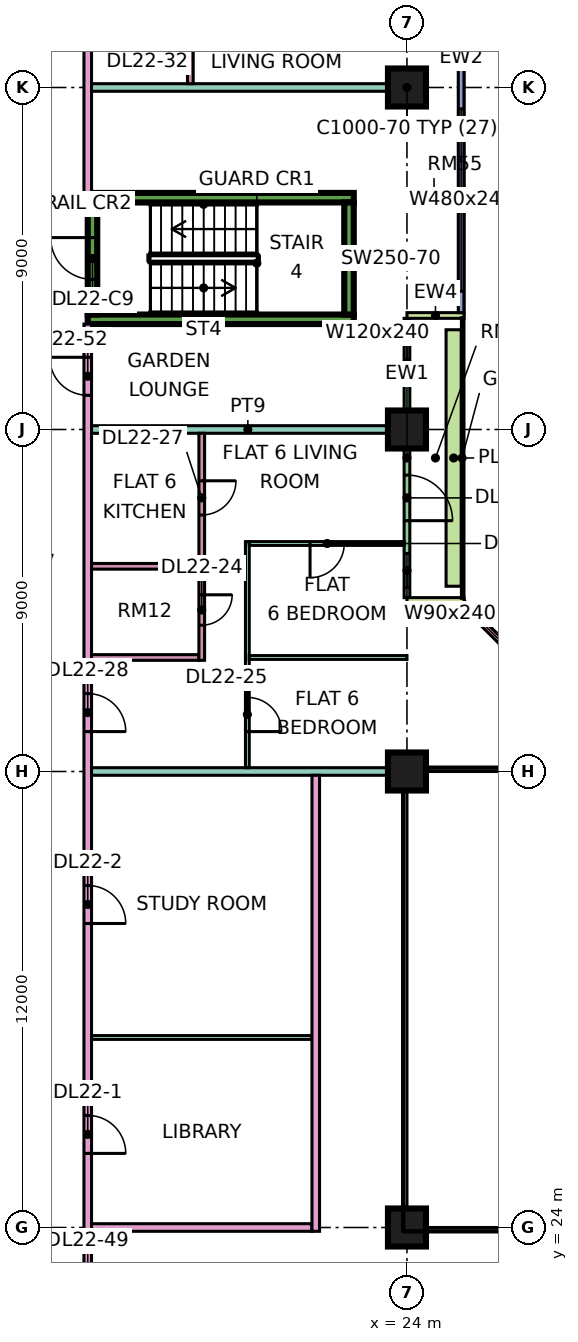
"""IFC4 building model, lengths in metres.
Left out: names, types, materials, properties, quantities, classifications, styles, units other than length and angle.
Written with IfcOpenShell. Run it as: python <this file> out.ifc"""

import sys

from ifc_helpers import new_model, si_unit, direction, frame, frame_2d, origin, origin_2d, place, context, subcontext, project, spatial, rectangle, extrude, element, fill, save


model = new_model("IFC4")
c1 = context("Model", 3, precision=1e-05, world=origin(), true_north=direction((0.0, 1.0)))
c2 = subcontext(c1, "Body", "Model", "MODEL_VIEW")
j1 = project(units=[si_unit("LENGTHUNIT", "METRE"), si_unit("PLANEANGLEUNIT", "RADIAN")], contexts=[c1])
p1 = place(None, origin())
s1 = spatial("IfcSite", under=j1, at=p1, CompositionType="ELEMENT")
p2 = place(p1, origin())
s2 = spatial("IfcBuilding", under=s1, at=p2, CompositionType="ELEMENT")
p3 = place(p2, frame((0.0, 0.0, 99.4)))
s3 = spatial("IfcBuildingStorey", under=s2, at=p3, CompositionType="ELEMENT", Elevation=99.4)
for number, where, z_axis, x_axis in (
    (1, (24.0, 24.0, 0.0), (0.0, 0.0, 1.0), (1.0, 0.0, 0.0)),
    (2, (24.0, 36.0, 0.0), (0.0, 0.0, 1.0), (1.0, 0.0, 0.0)),
    (3, (24.0, 45.0, 0.0), (0.0, 0.0, 1.0), (1.0, 0.0, 0.0)),
    (4, (24.0, 54.0, 0.0), (0.0, 0.0, 1.0), (1.0, 0.0, 0.0)),
):
    element("IfcColumn", number, at=place(p3, frame(where, z_axis=z_axis, x_axis=x_axis)), inside=s3, PredefinedType="COLUMN", context=c2, shape_type="SweptSolid", body=[
        extrude(rectangle(XDim=1.0, YDim=1.0, at=origin_2d()), origin(), (0.0, 0.0, 1.0), 3.75),
    ])
for number, where, z_axis, x_axis in (
    (5, (15.6, 47.9, 0.0), (0.0, 0.0, 1.0), (1.0, 0.0, 0.0)),
    (6, (15.6, 51.1, 0.0), (0.0, 0.0, 1.0), (1.0, 0.0, 0.0)),
):
    element("IfcWall", number, at=place(p3, frame(where, z_axis=z_axis, x_axis=x_axis)), inside=s3, PredefinedType="SHEAR", context=c2, shape_type="SweptSolid", body=[
        extrude(rectangle(XDim=7.0, YDim=0.25, at=frame_2d((3.5, 0.0))), origin(), (0.0, 0.0, 1.0), 3.75),
    ])
p4 = place(p3, frame((15.725, 48.025, 0.0), z_axis=(0.0, 0.0, 1.0), x_axis=(0.0, 1.0, 0.0)))
e7 = element("IfcWall", 7, at=p4, inside=s3, PredefinedType="SHEAR", context=c2, shape_type="SweptSolid", body=[
    extrude(rectangle(XDim=2.95, YDim=0.25, at=frame_2d((1.475, 0.0))), origin(), (0.0, 0.0, 1.0), 3.75),
])
p5 = place(p4, frame((0.925, 0.0, 0.0)))
e8 = element("IfcOpeningElement", 8, at=p5, cuts=e7, PredefinedType="OPENING", context=c2, shape_type="SweptSolid", body=[
    extrude(rectangle(XDim=1.1, YDim=2.2, at=frame_2d((0.55, 1.1))), frame((0.0, 0.135, 0.0), z_axis=(0.0, -1.0, 0.0), x_axis=(1.0, 0.0, 0.0)), (0.0, 0.0, 1.0), 0.27),
])
p6 = place(p3, frame((22.475, 48.025, 0.0), z_axis=(0.0, 0.0, 1.0), x_axis=(0.0, 1.0, 0.0)))
e9 = element("IfcWall", 9, at=p6, inside=s3, PredefinedType="SHEAR", context=c2, shape_type="SweptSolid", body=[
    extrude(rectangle(XDim=2.95, YDim=0.25, at=frame_2d((1.475, 0.0))), origin(), (0.0, 0.0, 1.0), 3.75),
])
p7 = place(p3, frame((28.447, 37.447, 0.0), z_axis=(0.0, 0.0, 1.0), x_axis=(-0.707106781187, 0.707106781187, 0.0)))
e10 = element("IfcWall", 10, at=p7, inside=s3, PredefinedType="SOLIDWALL", context=c2, shape_type="SweptSolid", body=[
    extrude(rectangle(XDim=4.243, YDim=0.15, at=frame_2d((2.121, 0.0))), origin(), (0.0, 0.0, 1.0), 3.35),
])
p8 = place(p7, frame((0.621, 0.0, 0.45)))
e11 = element("IfcOpeningElement", 11, at=p8, cuts=e10, PredefinedType="OPENING", context=c2, shape_type="SweptSolid", body=[
    extrude(rectangle(XDim=3.0, YDim=2.4, at=frame_2d((1.5, 1.2))), frame((0.0, 0.085, 0.0), z_axis=(0.0, -1.0, 0.0), x_axis=(1.0, 0.0, 0.0)), (0.0, 0.0, 1.0), 0.17),
])
p9 = place(p3, frame((24.0, 40.575, 0.0), z_axis=(0.0, 0.0, 1.0), x_axis=(0.0, 1.0, 0.0)))
e12 = element("IfcWall", 12, at=p9, inside=s3, PredefinedType="SOLIDWALL", context=c2, shape_type="SweptSolid", body=[
    extrude(rectangle(XDim=7.35, YDim=0.15, at=frame_2d((3.675, 0.0))), origin(), (0.0, 0.0, 1.0), 3.35),
])
p10 = place(p9, frame((0.262, 0.0, 0.45)))
e13 = element("IfcOpeningElement", 13, at=p10, cuts=e12, PredefinedType="OPENING", context=c2, shape_type="SweptSolid", body=[
    extrude(rectangle(XDim=0.9, YDim=2.4, at=frame_2d((0.45, 1.2))), frame((0.0, 0.085, 0.0), z_axis=(0.0, -1.0, 0.0), x_axis=(1.0, 0.0, 0.0)), (0.0, 0.0, 1.0), 0.17),
])
p11 = place(p9, frame((2.025, 0.0, 0.0)))
e14 = element("IfcOpeningElement", 14, at=p11, cuts=e12, PredefinedType="OPENING", context=c2, shape_type="SweptSolid", body=[
    extrude(rectangle(XDim=1.2, YDim=2.4, at=frame_2d((0.6, 1.2))), frame((0.0, 0.085, 0.0), z_axis=(0.0, -1.0, 0.0), x_axis=(1.0, 0.0, 0.0)), (0.0, 0.0, 1.0), 0.17),
])
p12 = place(p9, frame((5.587, 0.0, 0.45)))
e15 = element("IfcOpeningElement", 15, at=p12, cuts=e12, PredefinedType="OPENING", context=c2, shape_type="SweptSolid", body=[
    extrude(rectangle(XDim=1.2, YDim=2.4, at=frame_2d((0.6, 1.2))), frame((0.0, 0.085, 0.0), z_axis=(0.0, -1.0, 0.0), x_axis=(1.0, 0.0, 0.0)), (0.0, 0.0, 1.0), 0.17),
])
for number, where, z_axis, x_axis in (
    (16, (25.5, 40.5, 0.0), (0.0, 0.0, 1.0), (-1.0, 0.0, 0.0)),
    (17, (25.5, 48.0, 0.0), (0.0, 0.0, 1.0), (-1.0, 0.0, 0.0)),
):
    element("IfcWall", number, at=place(p3, frame(where, z_axis=z_axis, x_axis=x_axis)), inside=s3, PredefinedType="SOLIDWALL", context=c2, shape_type="SweptSolid", body=[
        extrude(rectangle(XDim=1.5, YDim=0.15, at=frame_2d((0.75, 0.0))), origin(), (0.0, 0.0, 1.0), 3.35),
    ])
p13 = place(p3, frame((25.425, 48.075, 0.0), z_axis=(0.0, 0.0, 1.0), x_axis=(0.0, 1.0, 0.0)))
e18 = element("IfcWall", 18, at=p13, inside=s3, PredefinedType="SOLIDWALL", context=c2, shape_type="SweptSolid", body=[
    extrude(rectangle(XDim=13.425, YDim=0.15, at=frame_2d((6.712, 0.0))), origin(), (0.0, 0.0, 1.0), 3.35),
])
p14 = place(p13, frame((0.562, 0.0, 0.45)))
e19 = element("IfcOpeningElement", 19, at=p14, cuts=e18, PredefinedType="OPENING", context=c2, shape_type="SweptSolid", body=[
    extrude(rectangle(XDim=4.8, YDim=2.4, at=frame_2d((2.4, 1.2))), frame((0.0, 0.085, 0.0), z_axis=(0.0, -1.0, 0.0), x_axis=(1.0, 0.0, 0.0)), (0.0, 0.0, 1.0), 0.17),
])
p15 = place(p13, frame((6.525, 0.0, 0.45)))
e20 = element("IfcOpeningElement", 20, at=p15, cuts=e18, PredefinedType="OPENING", context=c2, shape_type="SweptSolid", body=[
    extrude(rectangle(XDim=1.8, YDim=2.4, at=frame_2d((0.9, 1.2))), frame((0.0, 0.085, 0.0), z_axis=(0.0, -1.0, 0.0), x_axis=(1.0, 0.0, 0.0)), (0.0, 0.0, 1.0), 0.17),
])
p16 = place(p13, frame((9.525, 0.0, 0.45)))
e21 = element("IfcOpeningElement", 21, at=p16, cuts=e18, PredefinedType="OPENING", context=c2, shape_type="SweptSolid", body=[
    extrude(rectangle(XDim=1.8, YDim=2.4, at=frame_2d((0.9, 1.2))), frame((0.0, 0.085, 0.0), z_axis=(0.0, -1.0, 0.0), x_axis=(1.0, 0.0, 0.0)), (0.0, 0.0, 1.0), 0.17),
])
p17 = place(p13, frame((12.225, 0.0, 0.45)))
e22 = element("IfcOpeningElement", 22, at=p17, cuts=e18, PredefinedType="OPENING", context=c2, shape_type="SweptSolid", body=[
    extrude(rectangle(XDim=0.9, YDim=2.4, at=frame_2d((0.45, 1.2))), frame((0.0, 0.085, 0.0), z_axis=(0.0, -1.0, 0.0), x_axis=(1.0, 0.0, 0.0)), (0.0, 0.0, 1.0), 0.17),
])
p18 = place(p3, frame((25.229, 40.875, 0.0), z_axis=(0.0, 0.0, 1.0), x_axis=(0.0, 1.0, 0.0)))
e23 = element("IfcWall", 23, at=p18, inside=s3, PredefinedType="SOLIDWALL", context=c2, shape_type="SweptSolid", body=[
    extrude(rectangle(XDim=6.75, YDim=0.4, at=frame_2d((3.375, 0.0))), origin(), (0.0, 0.0, 1.0), 0.7),
])
p19 = place(p3, frame((15.6, 20.0, 0.0), z_axis=(0.0, 0.0, 1.0), x_axis=(0.0, 1.0, 0.0)))
e24 = element("IfcWall", 24, at=p19, inside=s3, PredefinedType="PARTITIONING", context=c2, shape_type="SweptSolid", body=[
    extrude(rectangle(XDim=27.775, YDim=0.2, at=frame_2d((13.887, 0.0))), origin(), (0.0, 0.0, 1.0), 3.35),
])
p20 = place(p19, frame((5.95, 0.0, 0.0)))
e25 = element("IfcOpeningElement", 25, at=p20, cuts=e24, PredefinedType="OPENING", context=c2, shape_type="SweptSolid", body=[
    extrude(rectangle(XDim=1.0, YDim=2.1, at=frame_2d((0.5, 1.05))), frame((0.0, 0.11, 0.0), z_axis=(0.0, -1.0, 0.0), x_axis=(1.0, 0.0, 0.0)), (0.0, 0.0, 1.0), 0.22),
])
p21 = place(p19, frame((12.0, 0.0, 0.0)))
e26 = element("IfcOpeningElement", 26, at=p21, cuts=e24, PredefinedType="OPENING", context=c2, shape_type="SweptSolid", body=[
    extrude(rectangle(XDim=1.0, YDim=2.1, at=frame_2d((0.5, 1.05))), frame((0.0, 0.11, 0.0), z_axis=(0.0, -1.0, 0.0), x_axis=(1.0, 0.0, 0.0)), (0.0, 0.0, 1.0), 0.22),
])
p22 = place(p19, frame((17.05, 0.0, 0.0)))
e27 = element("IfcOpeningElement", 27, at=p22, cuts=e24, PredefinedType="OPENING", context=c2, shape_type="SweptSolid", body=[
    extrude(rectangle(XDim=1.0, YDim=2.1, at=frame_2d((0.5, 1.05))), frame((0.0, 0.11, 0.0), z_axis=(0.0, -1.0, 0.0), x_axis=(1.0, 0.0, 0.0)), (0.0, 0.0, 1.0), 0.22),
])
p23 = place(p19, frame((1.15, 0.0, 0.0)))
e28 = element("IfcOpeningElement", 28, at=p23, cuts=e24, PredefinedType="OPENING", context=c2, shape_type="SweptSolid", body=[
    extrude(rectangle(XDim=1.8, YDim=2.1, at=frame_2d((0.9, 1.05))), frame((0.0, 0.11, 0.0), z_axis=(0.0, -1.0, 0.0), x_axis=(1.0, 0.0, 0.0)), (0.0, 0.0, 1.0), 0.22),
])
p24 = place(p19, frame((25.9, 0.0, 0.0)))
e29 = element("IfcOpeningElement", 29, at=p24, cuts=e24, PredefinedType="OPENING", context=c2, shape_type="SweptSolid", body=[
    extrude(rectangle(XDim=1.0, YDim=2.1, at=frame_2d((0.5, 1.05))), frame((0.0, 0.11, 0.0), z_axis=(0.0, -1.0, 0.0), x_axis=(1.0, 0.0, 0.0)), (0.0, 0.0, 1.0), 0.22),
])
p25 = place(p3, frame((15.6, 51.225, 0.0), z_axis=(0.0, 0.0, 1.0), x_axis=(0.0, 1.0, 0.0)))
e30 = element("IfcWall", 30, at=p25, inside=s3, PredefinedType="PARTITIONING", context=c2, shape_type="SweptSolid", body=[
    extrude(rectangle(XDim=11.701, YDim=0.2, at=frame_2d((5.851, 0.0))), origin(), (0.0, 0.0, 1.0), 3.35),
])
p26 = place(p25, frame((10.125, 0.0, 0.0)))
e31 = element("IfcOpeningElement", 31, at=p26, cuts=e30, PredefinedType="OPENING", context=c2, shape_type="SweptSolid", body=[
    extrude(rectangle(XDim=1.0, YDim=2.1, at=frame_2d((0.5, 1.05))), frame((0.0, 0.11, 0.0), z_axis=(0.0, -1.0, 0.0), x_axis=(1.0, 0.0, 0.0)), (0.0, 0.0, 1.0), 0.22),
])
p27 = place(p3, frame((15.7, 24.0, 0.0), z_axis=(0.0, 0.0, 1.0), x_axis=(1.0, 0.0, 0.0)))
e32 = element("IfcWall", 32, at=p27, inside=s3, PredefinedType="PARTITIONING", context=c2, shape_type="SweptSolid", body=[
    extrude(rectangle(XDim=5.8, YDim=0.2, at=frame_2d((2.9, 0.0))), origin(), (0.0, 0.0, 1.0), 3.35),
])
p28 = place(p3, frame((15.7, 29.0, 0.0), z_axis=(0.0, 0.0, 1.0), x_axis=(1.0, 0.0, 0.0)))
e33 = element("IfcWall", 33, at=p28, inside=s3, PredefinedType="PARTITIONING", context=c2, shape_type="SweptSolid", body=[
    extrude(rectangle(XDim=5.8, YDim=0.1, at=frame_2d((2.9, 0.0))), origin(), (0.0, 0.0, 1.0), 3.35),
])
p29 = place(p3, frame((15.7, 36.0, 0.0), z_axis=(0.0, 0.0, 1.0), x_axis=(1.0, 0.0, 0.0)))
e34 = element("IfcWall", 34, at=p29, inside=s3, PredefinedType="PARTITIONING", context=c2, shape_type="SweptSolid", body=[
    extrude(rectangle(XDim=8.3, YDim=0.2, at=frame_2d((4.15, 0.0))), origin(), (0.0, 0.0, 1.0), 3.35),
])
for number, where, z_axis, x_axis in (
    (35, (15.7, 39.0, 0.0), (0.0, 0.0, 1.0), (1.0, 0.0, 0.0)),
    (36, (15.7, 41.4, 0.0), (0.0, 0.0, 1.0), (1.0, 0.0, 0.0)),
):
    element("IfcWall", number, at=place(p3, frame(where, z_axis=z_axis, x_axis=x_axis)), inside=s3, PredefinedType="PARTITIONING", context=c2, shape_type="SweptSolid", body=[
        extrude(rectangle(XDim=2.825, YDim=0.15, at=frame_2d((1.413, 0.0))), origin(), (0.0, 0.0, 1.0), 3.35),
    ])
p30 = place(p3, frame((15.7, 45.0, 0.0), z_axis=(0.0, 0.0, 1.0), x_axis=(1.0, 0.0, 0.0)))
e37 = element("IfcWall", 37, at=p30, inside=s3, PredefinedType="PARTITIONING", context=c2, shape_type="SweptSolid", body=[
    extrude(rectangle(XDim=8.226, YDim=0.2, at=frame_2d((4.113, 0.0))), origin(), (0.0, 0.0, 1.0), 3.35),
])
p31 = place(p3, frame((15.7, 54.0, 0.0), z_axis=(0.0, 0.0, 1.0), x_axis=(1.0, 0.0, 0.0)))
e38 = element("IfcWall", 38, at=p31, inside=s3, PredefinedType="PARTITIONING", context=c2, shape_type="SweptSolid", body=[
    extrude(rectangle(XDim=8.3, YDim=0.2, at=frame_2d((4.15, 0.0))), origin(), (0.0, 0.0, 1.0), 3.35),
])
p32 = place(p3, frame((18.3, 54.1, 0.0), z_axis=(0.0, 0.0, 1.0), x_axis=(0.0, 1.0, 0.0)))
e39 = element("IfcWall", 39, at=p32, inside=s3, PredefinedType="PARTITIONING", context=c2, shape_type="SweptSolid", body=[
    extrude(rectangle(XDim=6.575, YDim=0.15, at=frame_2d((3.288, 0.0))), origin(), (0.0, 0.0, 1.0), 3.35),
])
p33 = place(p32, frame((4.65, 0.0, 0.0)))
e40 = element("IfcOpeningElement", 40, at=p33, cuts=e39, PredefinedType="OPENING", context=c2, shape_type="SweptSolid", body=[
    extrude(rectangle(XDim=0.8, YDim=2.1, at=frame_2d((0.4, 1.05))), frame((0.0, 0.085, 0.0), z_axis=(0.0, -1.0, 0.0), x_axis=(1.0, 0.0, 0.0)), (0.0, 0.0, 1.0), 0.17),
])
p34 = place(p32, frame((1.25, 0.0, 0.0)))
e41 = element("IfcOpeningElement", 41, at=p34, cuts=e39, PredefinedType="OPENING", context=c2, shape_type="SweptSolid", body=[
    extrude(rectangle(XDim=0.9, YDim=2.1, at=frame_2d((0.45, 1.05))), frame((0.0, 0.085, 0.0), z_axis=(0.0, -1.0, 0.0), x_axis=(1.0, 0.0, 0.0)), (0.0, 0.0, 1.0), 0.17),
])
p35 = place(p3, frame((18.6, 38.925, 0.0), z_axis=(0.0, 0.0, 1.0), x_axis=(0.0, 1.0, 0.0)))
e42 = element("IfcWall", 42, at=p35, inside=s3, PredefinedType="PARTITIONING", context=c2, shape_type="SweptSolid", body=[
    extrude(rectangle(XDim=5.975, YDim=0.15, at=frame_2d((2.987, 0.0))), origin(), (0.0, 0.0, 1.0), 3.35),
])
p36 = place(p35, frame((0.925, 0.0, 0.0)))
e43 = element("IfcOpeningElement", 43, at=p36, cuts=e42, PredefinedType="OPENING", context=c2, shape_type="SweptSolid", body=[
    extrude(rectangle(XDim=0.8, YDim=2.1, at=frame_2d((0.4, 1.05))), frame((0.0, 0.085, 0.0), z_axis=(0.0, -1.0, 0.0), x_axis=(1.0, 0.0, 0.0)), (0.0, 0.0, 1.0), 0.17),
])
p37 = place(p35, frame((3.825, 0.0, 0.0)))
e44 = element("IfcOpeningElement", 44, at=p37, cuts=e42, PredefinedType="OPENING", context=c2, shape_type="SweptSolid", body=[
    extrude(rectangle(XDim=0.9, YDim=2.1, at=frame_2d((0.45, 1.05))), frame((0.0, 0.085, 0.0), z_axis=(0.0, -1.0, 0.0), x_axis=(1.0, 0.0, 0.0)), (0.0, 0.0, 1.0), 0.17),
])
p38 = place(p3, frame((19.8, 36.1, 0.0), z_axis=(0.0, 0.0, 1.0), x_axis=(0.0, 1.0, 0.0)))
e45 = element("IfcWall", 45, at=p38, inside=s3, PredefinedType="PARTITIONING", context=c2, shape_type="SweptSolid", body=[
    extrude(rectangle(XDim=5.95, YDim=0.1, at=frame_2d((2.975, 0.0))), origin(), (0.0, 0.0, 1.0), 3.35),
])
p39 = place(p38, frame((0.95, 0.0, 0.0)))
e46 = element("IfcOpeningElement", 46, at=p39, cuts=e45, PredefinedType="OPENING", context=c2, shape_type="SweptSolid", body=[
    extrude(rectangle(XDim=0.9, YDim=2.1, at=frame_2d((0.45, 1.05))), frame((0.0, 0.06, 0.0), z_axis=(0.0, -1.0, 0.0), x_axis=(1.0, 0.0, 0.0)), (0.0, 0.0, 1.0), 0.12),
])
p40 = place(p3, frame((19.85, 39.0, 0.0), z_axis=(0.0, 0.0, 1.0), x_axis=(1.0, 0.0, 0.0)))
e47 = element("IfcWall", 47, at=p40, inside=s3, PredefinedType="PARTITIONING", context=c2, shape_type="SweptSolid", body=[
    extrude(rectangle(XDim=4.15, YDim=0.1, at=frame_2d((2.075, 0.0))), origin(), (0.0, 0.0, 1.0), 3.35),
])
p41 = place(p3, frame((19.85, 42.0, 0.0), z_axis=(0.0, 0.0, 1.0), x_axis=(1.0, 0.0, 0.0)))
e48 = element("IfcWall", 48, at=p41, inside=s3, PredefinedType="PARTITIONING", context=c2, shape_type="SweptSolid", body=[
    extrude(rectangle(XDim=4.076, YDim=0.1, at=frame_2d((2.038, 0.0))), origin(), (0.0, 0.0, 1.0), 3.35),
])
p42 = place(p41, frame((1.6, 0.0, 0.0)))
e49 = element("IfcOpeningElement", 49, at=p42, cuts=e48, PredefinedType="OPENING", context=c2, shape_type="SweptSolid", body=[
    extrude(rectangle(XDim=0.9, YDim=2.1, at=frame_2d((0.45, 1.05))), frame((0.0, 0.06, 0.0), z_axis=(0.0, -1.0, 0.0), x_axis=(1.0, 0.0, 0.0)), (0.0, 0.0, 1.0), 0.12),
])
p43 = place(p3, frame((21.6, 23.9, 0.0), z_axis=(0.0, 0.0, 1.0), x_axis=(0.0, 1.0, 0.0)))
e50 = element("IfcWall", 50, at=p43, inside=s3, PredefinedType="PARTITIONING", context=c2, shape_type="SweptSolid", body=[
    extrude(rectangle(XDim=12.0, YDim=0.2, at=frame_2d((6.0, 0.0))), origin(), (0.0, 0.0, 1.0), 3.35),
])
p44 = place(p8, origin())
e51 = element("IfcWindow", 51, at=p44, inside=s3, PartitioningType="SINGLE_PANEL", PredefinedType="WINDOW", context=c2, shape_type="SweptSolid", body=[
    extrude(rectangle(XDim=3.0, YDim=2.4, at=frame_2d((1.5, 1.2))), frame((0.0, 0.03, 0.0), z_axis=(0.0, -1.0, 0.0), x_axis=(1.0, 0.0, 0.0)), (0.0, 0.0, 1.0), 0.06),
])
fill(e11, e51)
p45 = place(p10, origin())
e52 = element("IfcWindow", 52, at=p45, inside=s3, PartitioningType="SINGLE_PANEL", PredefinedType="WINDOW", context=c2, shape_type="SweptSolid", body=[
    extrude(rectangle(XDim=0.9, YDim=2.4, at=frame_2d((0.45, 1.2))), frame((0.0, 0.03, 0.0), z_axis=(0.0, -1.0, 0.0), x_axis=(1.0, 0.0, 0.0)), (0.0, 0.0, 1.0), 0.06),
])
fill(e13, e52)
p46 = place(p11, frame((1.2, 0.0, 0.0), z_axis=(0.0, 0.0, 1.0), x_axis=(-1.0, 0.0, 0.0)))
e53 = element("IfcDoor", 53, at=p46, inside=s3, OperationType="DOUBLE_DOOR_SINGLE_SWING", PredefinedType="DOOR", context=c2, shape_type="SweptSolid", body=[
    extrude(rectangle(XDim=1.2, YDim=2.4, at=frame_2d((0.6, 1.2))), frame((0.0, 0.025, 0.0), z_axis=(0.0, -1.0, 0.0), x_axis=(1.0, 0.0, 0.0)), (0.0, 0.0, 1.0), 0.05),
])
fill(e14, e53)
p47 = place(p12, origin())
e54 = element("IfcWindow", 54, at=p47, inside=s3, PartitioningType="SINGLE_PANEL", PredefinedType="WINDOW", context=c2, shape_type="SweptSolid", body=[
    extrude(rectangle(XDim=1.2, YDim=2.4, at=frame_2d((0.6, 1.2))), frame((0.0, 0.03, 0.0), z_axis=(0.0, -1.0, 0.0), x_axis=(1.0, 0.0, 0.0)), (0.0, 0.0, 1.0), 0.06),
])
fill(e15, e54)
p48 = place(p14, origin())
e55 = element("IfcWindow", 55, at=p48, inside=s3, PartitioningType="SINGLE_PANEL", PredefinedType="WINDOW", context=c2, shape_type="SweptSolid", body=[
    extrude(rectangle(XDim=4.8, YDim=2.4, at=frame_2d((2.4, 1.2))), frame((0.0, 0.03, 0.0), z_axis=(0.0, -1.0, 0.0), x_axis=(1.0, 0.0, 0.0)), (0.0, 0.0, 1.0), 0.06),
])
fill(e19, e55)
p49 = place(p15, origin())
e56 = element("IfcWindow", 56, at=p49, inside=s3, PartitioningType="SINGLE_PANEL", PredefinedType="WINDOW", context=c2, shape_type="SweptSolid", body=[
    extrude(rectangle(XDim=1.8, YDim=2.4, at=frame_2d((0.9, 1.2))), frame((0.0, 0.03, 0.0), z_axis=(0.0, -1.0, 0.0), x_axis=(1.0, 0.0, 0.0)), (0.0, 0.0, 1.0), 0.06),
])
fill(e20, e56)
p50 = place(p5, frame((1.1, 0.0, 0.0), z_axis=(0.0, 0.0, 1.0), x_axis=(-1.0, 0.0, 0.0)))
e57 = element("IfcDoor", 57, at=p50, inside=s3, OperationType="SINGLE_SWING_RIGHT", PredefinedType="DOOR", context=c2, shape_type="SweptSolid", body=[
    extrude(rectangle(XDim=1.1, YDim=2.2, at=frame_2d((0.55, 1.1))), frame((0.0, 0.025, 0.0), z_axis=(0.0, -1.0, 0.0), x_axis=(1.0, 0.0, 0.0)), (0.0, 0.0, 1.0), 0.05),
])
fill(e8, e57)
p51 = place(p20, frame((1.0, 0.0, 0.0), z_axis=(0.0, 0.0, 1.0), x_axis=(-1.0, 0.0, 0.0)))
e58 = element("IfcDoor", 58, at=p51, inside=s3, OperationType="SINGLE_SWING_LEFT", PredefinedType="DOOR", context=c2, shape_type="SweptSolid", body=[
    extrude(rectangle(XDim=1.0, YDim=2.1, at=frame_2d((0.5, 1.05))), frame((0.0, 0.025, 0.0), z_axis=(0.0, -1.0, 0.0), x_axis=(1.0, 0.0, 0.0)), (0.0, 0.0, 1.0), 0.05),
])
fill(e25, e58)
p52 = place(p21, frame((1.0, 0.0, 0.0), z_axis=(0.0, 0.0, 1.0), x_axis=(-1.0, 0.0, 0.0)))
e59 = element("IfcDoor", 59, at=p52, inside=s3, OperationType="SINGLE_SWING_LEFT", PredefinedType="DOOR", context=c2, shape_type="SweptSolid", body=[
    extrude(rectangle(XDim=1.0, YDim=2.1, at=frame_2d((0.5, 1.05))), frame((0.0, 0.025, 0.0), z_axis=(0.0, -1.0, 0.0), x_axis=(1.0, 0.0, 0.0)), (0.0, 0.0, 1.0), 0.05),
])
fill(e26, e59)
p53 = place(p36, origin())
e60 = element("IfcDoor", 60, at=p53, inside=s3, OperationType="SINGLE_SWING_RIGHT", PredefinedType="DOOR", context=c2, shape_type="SweptSolid", body=[
    extrude(rectangle(XDim=0.8, YDim=2.1, at=frame_2d((0.4, 1.05))), frame((0.0, 0.025, 0.0), z_axis=(0.0, -1.0, 0.0), x_axis=(1.0, 0.0, 0.0)), (0.0, 0.0, 1.0), 0.05),
])
fill(e43, e60)
p54 = place(p39, frame((0.9, 0.0, 0.0), z_axis=(0.0, 0.0, 1.0), x_axis=(-1.0, 0.0, 0.0)))
e61 = element("IfcDoor", 61, at=p54, inside=s3, OperationType="SINGLE_SWING_LEFT", PredefinedType="DOOR", context=c2, shape_type="SweptSolid", body=[
    extrude(rectangle(XDim=0.9, YDim=2.1, at=frame_2d((0.45, 1.05))), frame((0.0, 0.025, 0.0), z_axis=(0.0, -1.0, 0.0), x_axis=(1.0, 0.0, 0.0)), (0.0, 0.0, 1.0), 0.05),
])
fill(e46, e61)
p55 = place(p42, frame((0.9, 0.0, 0.0), z_axis=(0.0, 0.0, 1.0), x_axis=(-1.0, 0.0, 0.0)))
e62 = element("IfcDoor", 62, at=p55, inside=s3, OperationType="SINGLE_SWING_LEFT", PredefinedType="DOOR", context=c2, shape_type="SweptSolid", body=[
    extrude(rectangle(XDim=0.9, YDim=2.1, at=frame_2d((0.45, 1.05))), frame((0.0, 0.025, 0.0), z_axis=(0.0, -1.0, 0.0), x_axis=(1.0, 0.0, 0.0)), (0.0, 0.0, 1.0), 0.05),
])
fill(e49, e62)
p56 = place(p37, origin())
e63 = element("IfcDoor", 63, at=p56, inside=s3, OperationType="SINGLE_SWING_RIGHT", PredefinedType="DOOR", context=c2, shape_type="SweptSolid", body=[
    extrude(rectangle(XDim=0.9, YDim=2.1, at=frame_2d((0.45, 1.05))), frame((0.0, 0.025, 0.0), z_axis=(0.0, -1.0, 0.0), x_axis=(1.0, 0.0, 0.0)), (0.0, 0.0, 1.0), 0.05),
])
fill(e44, e63)
p57 = place(p22, frame((1.0, 0.0, 0.0), z_axis=(0.0, 0.0, 1.0), x_axis=(-1.0, 0.0, 0.0)))
e64 = element("IfcDoor", 64, at=p57, inside=s3, OperationType="SINGLE_SWING_LEFT", PredefinedType="DOOR", context=c2, shape_type="SweptSolid", body=[
    extrude(rectangle(XDim=1.0, YDim=2.1, at=frame_2d((0.5, 1.05))), frame((0.0, 0.025, 0.0), z_axis=(0.0, -1.0, 0.0), x_axis=(1.0, 0.0, 0.0)), (0.0, 0.0, 1.0), 0.05),
])
fill(e27, e64)
p58 = place(p24, frame((1.0, 0.0, 0.0), z_axis=(0.0, 0.0, 1.0), x_axis=(-1.0, 0.0, 0.0)))
e65 = element("IfcDoor", 65, at=p58, inside=s3, OperationType="SINGLE_SWING_RIGHT", PredefinedType="DOOR", context=c2, shape_type="SweptSolid", body=[
    extrude(rectangle(XDim=1.0, YDim=2.1, at=frame_2d((0.5, 1.05))), frame((0.0, 0.025, 0.0), z_axis=(0.0, -1.0, 0.0), x_axis=(1.0, 0.0, 0.0)), (0.0, 0.0, 1.0), 0.05),
])
fill(e29, e65)
save(model, sys.argv[1])
